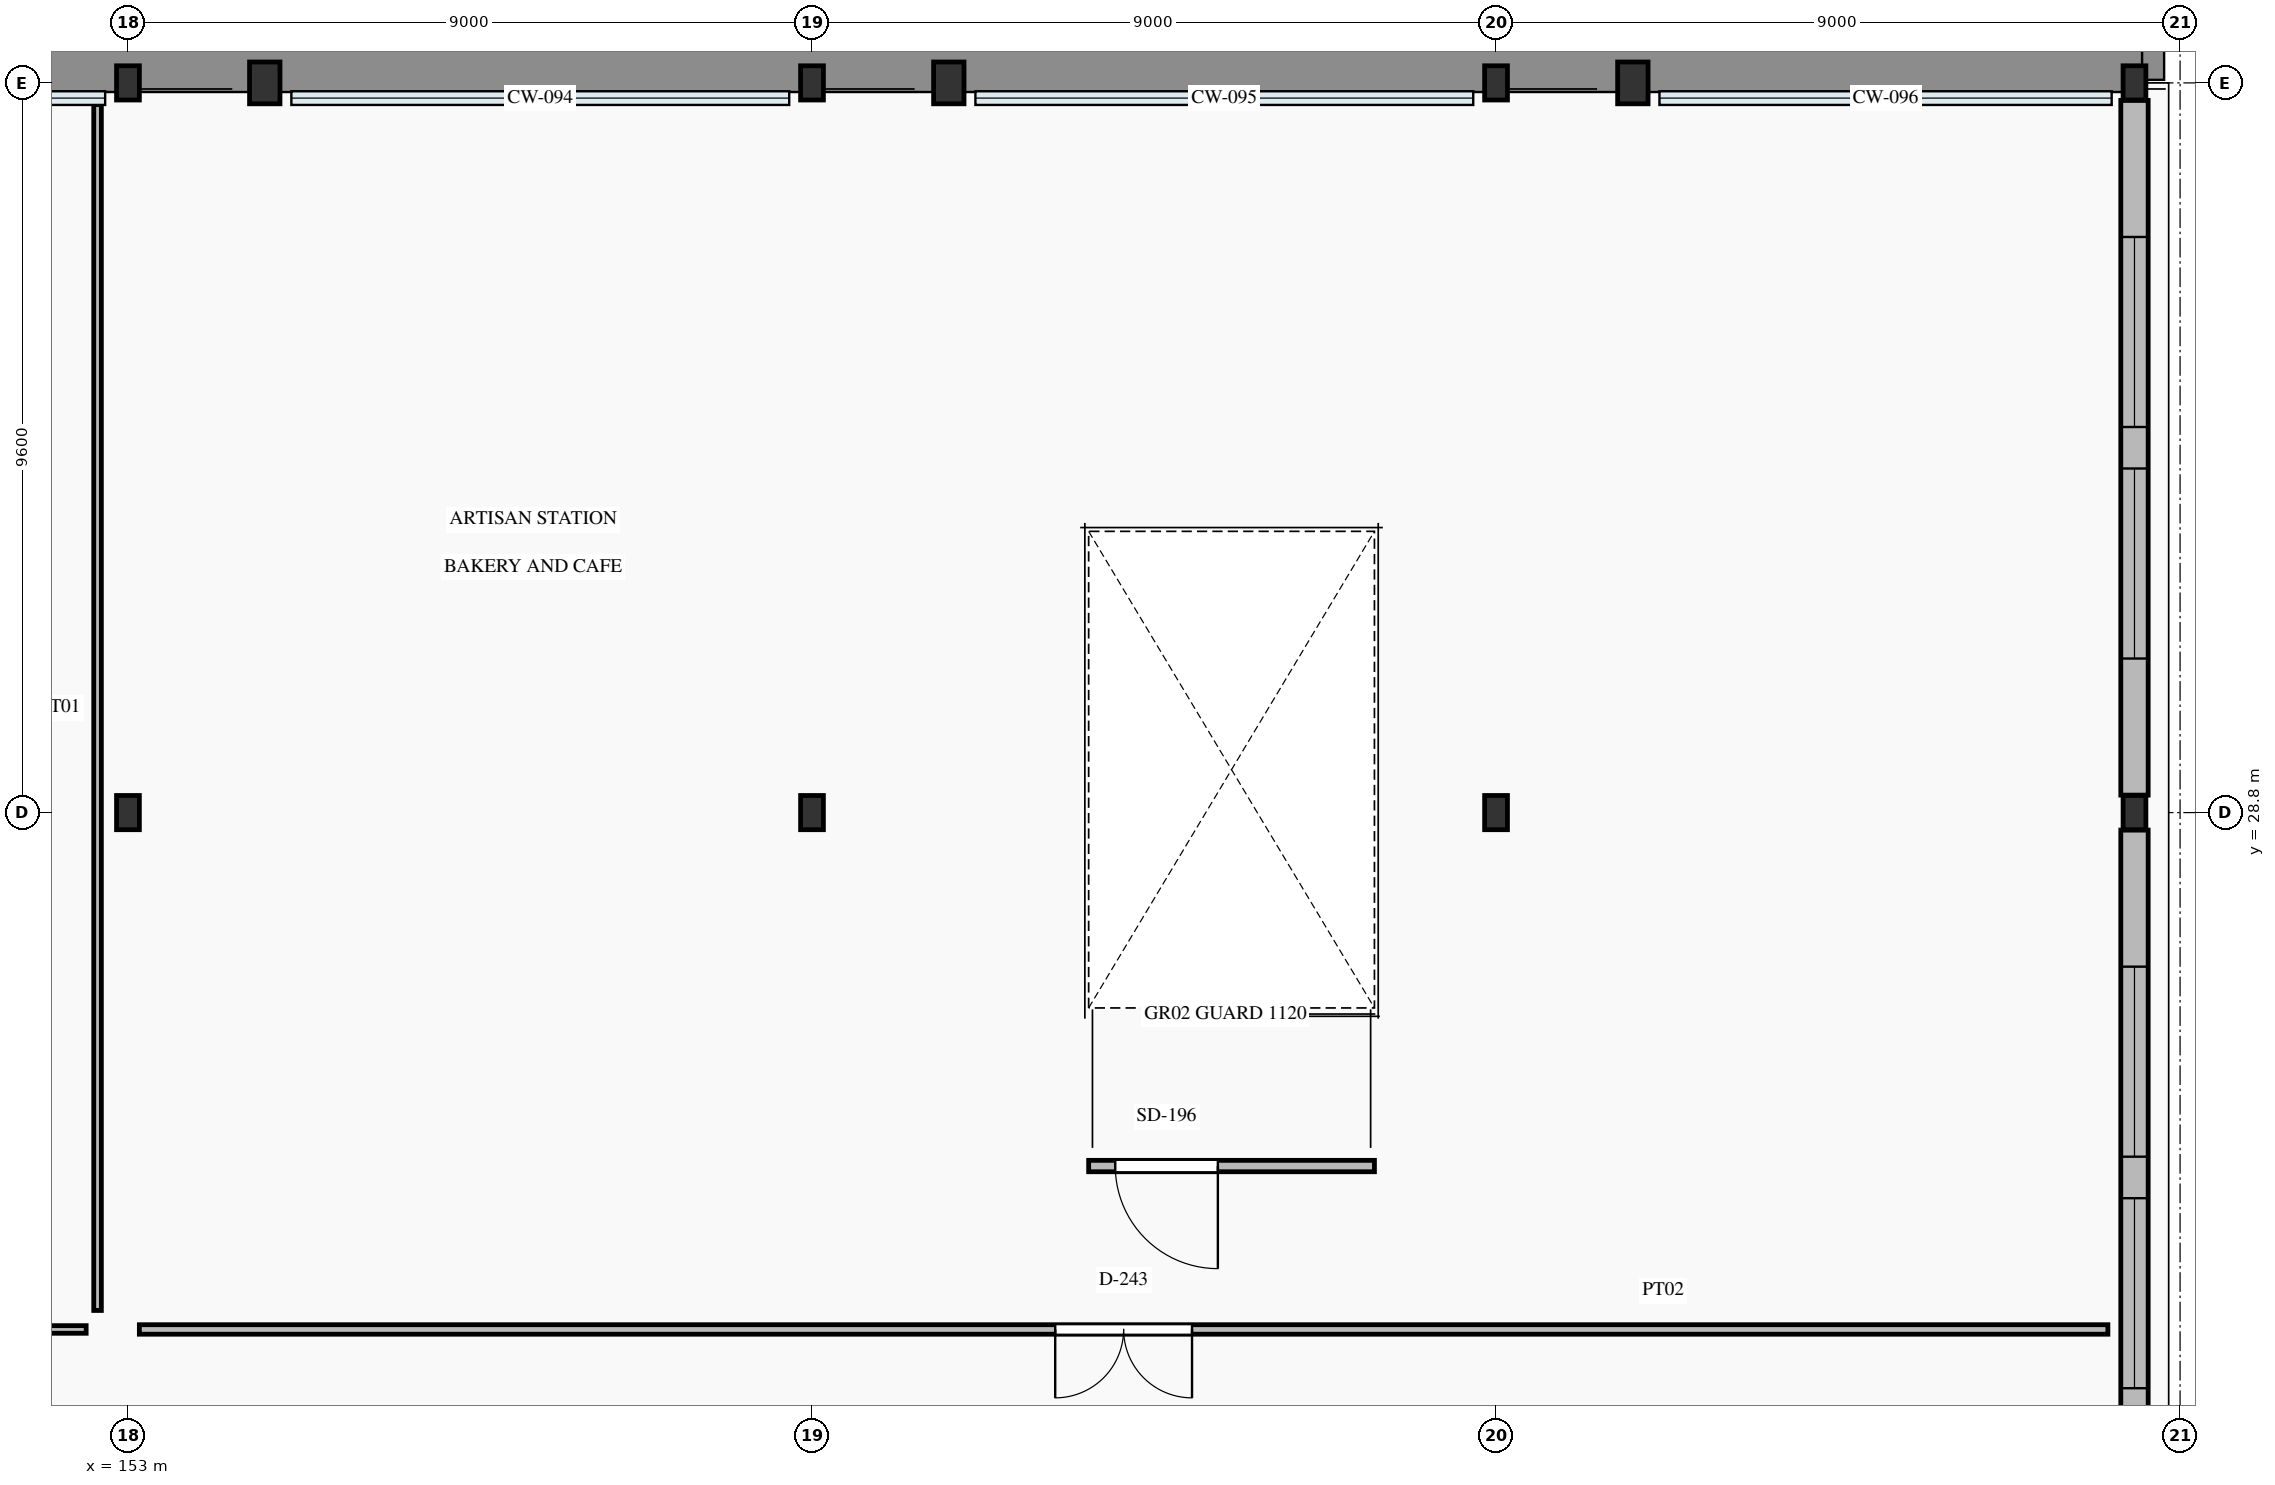
"""IFC4 building model, lengths in metres.
Left out: names, types, materials, properties, quantities, classifications, styles, units other than length and angle.
Written with IfcOpenShell. Run it as: python <this file> out.ifc"""

import sys

from ifc_helpers import new_model, si_unit, direction, frame, frame_2d, origin, origin_2d, place, context, subcontext, project, spatial, rectangle, i_section, extrude, element, fill, save


model = new_model("IFC4")
c1 = context("Model", 3, precision=1e-05, world=origin(), true_north=direction((0.0, 1.0)))
c2 = subcontext(c1, "Body", "Model", "MODEL_VIEW")
j1 = project(units=[si_unit("LENGTHUNIT", "METRE"), si_unit("PLANEANGLEUNIT", "RADIAN")], contexts=[c1])
p1 = place(None, origin())
s1 = spatial("IfcSite", under=j1, at=p1, CompositionType="ELEMENT")
p2 = place(p1, origin())
s2 = spatial("IfcBuilding", under=s1, at=p2, CompositionType="ELEMENT")
p3 = place(p2, frame((0.0, 0.0, 6.0)))
s3 = spatial("IfcBuildingStorey", under=s2, at=p3, CompositionType="ELEMENT", Elevation=6.0)
for number, where, z_axis, x_axis in (
    (1, (153.0, 28.8, 0.0), (0.0, 0.0, 1.0), (1.0, 0.0, 0.0)),
    (2, (153.0, 38.4, 0.0), (0.0, 0.0, 1.0), (1.0, 0.0, 0.0)),
    (3, (162.0, 28.8, 0.0), (0.0, 0.0, 1.0), (1.0, 0.0, 0.0)),
    (4, (162.0, 38.4, 0.0), (0.0, 0.0, 1.0), (1.0, 0.0, 0.0)),
    (5, (171.0, 28.8, 0.0), (0.0, 0.0, 1.0), (1.0, 0.0, 0.0)),
    (6, (171.0, 38.4, 0.0), (0.0, 0.0, 1.0), (1.0, 0.0, 0.0)),
    (7, (179.4, 28.8, 0.0), (0.0, 0.0, 1.0), (1.0, 0.0, 0.0)),
    (8, (179.4, 38.4, 0.0), (0.0, 0.0, 1.0), (1.0, 0.0, 0.0)),
):
    element("IfcColumn", number, at=place(p3, frame(where, z_axis=z_axis, x_axis=x_axis)), inside=s3, PredefinedType="COLUMN", context=c2, shape_type="SweptSolid", body=[
        extrude(i_section(OverallWidth=0.3, OverallDepth=0.45, WebThickness=0.014, FlangeThickness=0.026, FilletRadius=0.027, at=origin_2d()), origin(), (0.0, 0.0, 1.0), 4.8),
    ])
for number, where, z_axis, x_axis in (
    (9, (154.8, 38.4, 0.0), (0.0, 0.0, 1.0), (1.0, 0.0, 0.0)),
    (10, (163.8, 38.4, 0.0), (0.0, 0.0, 1.0), (1.0, 0.0, 0.0)),
    (11, (172.8, 38.4, 0.0), (0.0, 0.0, 1.0), (1.0, 0.0, 0.0)),
):
    element("IfcColumn", number, at=place(p3, frame(where, z_axis=z_axis, x_axis=x_axis)), inside=s3, PredefinedType="PILASTER", context=c2, shape_type="SweptSolid", body=[
        extrude(rectangle(XDim=0.4, YDim=0.55, at=origin_2d()), origin(), (0.0, 0.0, 1.0), 4.8),
    ])
p4 = place(p3, frame((179.4, 19.43, 0.0), z_axis=(0.0, 0.0, 1.0), x_axis=(0.0, 1.0, 0.0)))
e12 = element("IfcWall", 12, at=p4, inside=s3, PredefinedType="SOLIDWALL", context=c2, shape_type="SweptSolid", body=[
    extrude(rectangle(XDim=9.14, YDim=0.36, at=frame_2d((4.57, 0.0))), origin(), (0.0, 0.0, 1.0), 4.185),
])
p5 = place(p4, frame((1.797, 0.0, 0.95)))
e13 = element("IfcOpeningElement", 13, at=p5, cuts=e12, PredefinedType="OPENING", context=c2, shape_type="SweptSolid", body=[
    extrude(rectangle(XDim=2.5, YDim=2.7, at=frame_2d((1.25, 1.35))), frame((0.0, 0.195, 0.0), z_axis=(0.0, -1.0, 0.0), x_axis=(1.0, 0.0, 0.0)), (0.0, 0.0, 1.0), 0.39),
])
p6 = place(p4, frame((4.843, 0.0, 0.95)))
e14 = element("IfcOpeningElement", 14, at=p6, cuts=e12, PredefinedType="OPENING", context=c2, shape_type="SweptSolid", body=[
    extrude(rectangle(XDim=2.5, YDim=2.7, at=frame_2d((1.25, 1.35))), frame((0.0, 0.195, 0.0), z_axis=(0.0, -1.0, 0.0), x_axis=(1.0, 0.0, 0.0)), (0.0, 0.0, 1.0), 0.39),
])
p7 = place(p3, frame((179.4, 29.03, 0.0), z_axis=(0.0, 0.0, 1.0), x_axis=(0.0, 1.0, 0.0)))
e15 = element("IfcWall", 15, at=p7, inside=s3, PredefinedType="SOLIDWALL", context=c2, shape_type="SweptSolid", body=[
    extrude(rectangle(XDim=9.14, YDim=0.36, at=frame_2d((4.57, 0.0))), origin(), (0.0, 0.0, 1.0), 4.185),
])
p8 = place(p7, frame((1.797, 0.0, 0.95)))
e16 = element("IfcOpeningElement", 16, at=p8, cuts=e15, PredefinedType="OPENING", context=c2, shape_type="SweptSolid", body=[
    extrude(rectangle(XDim=2.5, YDim=2.7, at=frame_2d((1.25, 1.35))), frame((0.0, 0.195, 0.0), z_axis=(0.0, -1.0, 0.0), x_axis=(1.0, 0.0, 0.0)), (0.0, 0.0, 1.0), 0.39),
])
p9 = place(p7, frame((4.843, 0.0, 0.95)))
e17 = element("IfcOpeningElement", 17, at=p9, cuts=e15, PredefinedType="OPENING", context=c2, shape_type="SweptSolid", body=[
    extrude(rectangle(XDim=2.5, YDim=2.7, at=frame_2d((1.25, 1.35))), frame((0.0, 0.195, 0.0), z_axis=(0.0, -1.0, 0.0), x_axis=(1.0, 0.0, 0.0)), (0.0, 0.0, 1.0), 0.39),
])
p10 = place(p3, frame((165.64, 24.15, 0.0), z_axis=(0.0, 0.0, 1.0), x_axis=(1.0, 0.0, 0.0)))
e18 = element("IfcWall", 18, at=p10, inside=s3, PredefinedType="PARTITIONING", context=c2, shape_type="SweptSolid", body=[
    extrude(rectangle(XDim=3.76, YDim=0.15, at=frame_2d((1.88, 0.0))), origin(), (0.0, 0.0, 1.0), 4.53),
])
p11 = place(p10, frame((0.35, 0.0, 0.0)))
e19 = element("IfcOpeningElement", 19, at=p11, cuts=e18, PredefinedType="OPENING", context=c2, shape_type="SweptSolid", body=[
    extrude(rectangle(XDim=1.35, YDim=2.2, at=frame_2d((0.675, 1.1))), frame((0.0, 0.09, 0.0), z_axis=(0.0, -1.0, 0.0), x_axis=(1.0, 0.0, 0.0)), (0.0, 0.0, 1.0), 0.18),
])
p12 = place(p3, frame((139.0, 22.0, 0.0), z_axis=(0.0, 0.0, 1.0), x_axis=(1.0, 0.0, 0.0)))
e20 = element("IfcWall", 20, at=p12, inside=s3, PredefinedType="PARTITIONING", context=c2, shape_type="SweptSolid", body=[
    extrude(rectangle(XDim=13.45, YDim=0.1, at=frame_2d((6.725, 0.0))), origin(), (0.0, 0.0, 1.0), 4.53),
])
p13 = place(p12, frame((5.825, 0.0, 0.0)))
e21 = element("IfcOpeningElement", 21, at=p13, cuts=e20, PredefinedType="OPENING", context=c2, shape_type="SweptSolid", body=[
    extrude(rectangle(XDim=1.8, YDim=2.3, at=frame_2d((0.9, 1.15))), frame((0.0, 0.065, 0.0), z_axis=(0.0, -1.0, 0.0), x_axis=(1.0, 0.0, 0.0)), (0.0, 0.0, 1.0), 0.13),
])
p14 = place(p3, frame((153.15, 22.0, 0.0), z_axis=(0.0, 0.0, 1.0), x_axis=(1.0, 0.0, 0.0)))
e22 = element("IfcWall", 22, at=p14, inside=s3, PredefinedType="PARTITIONING", context=c2, shape_type="SweptSolid", body=[
    extrude(rectangle(XDim=25.9, YDim=0.125, at=frame_2d((12.95, 0.0))), origin(), (0.0, 0.0, 1.0), 4.53),
])
p15 = place(p14, frame((12.05, 0.0, 0.0)))
e23 = element("IfcOpeningElement", 23, at=p15, cuts=e22, PredefinedType="OPENING", context=c2, shape_type="SweptSolid", body=[
    extrude(rectangle(XDim=1.8, YDim=2.3, at=frame_2d((0.9, 1.15))), frame((0.0, 0.077, 0.0), z_axis=(0.0, -1.0, 0.0), x_axis=(1.0, 0.0, 0.0)), (0.0, 0.0, 1.0), 0.155),
])
p16 = place(p3, frame((152.6, 22.25, 0.0), z_axis=(0.0, 0.0, 1.0), x_axis=(0.0, 1.0, 0.0)))
e24 = element("IfcWall", 24, at=p16, inside=s3, PredefinedType="PARTITIONING", context=c2, shape_type="SweptSolid", body=[
    extrude(rectangle(XDim=15.865, YDim=0.1, at=frame_2d((7.933, 0.0))), origin(), (0.0, 0.0, 1.0), 4.53),
])
p17 = place(p5, origin())
e25 = element("IfcWindow", 25, at=p17, inside=s3, PartitioningType="SINGLE_PANEL", PredefinedType="WINDOW", context=c2, shape_type="SweptSolid", body=[
    extrude(rectangle(XDim=2.5, YDim=2.7, at=frame_2d((1.25, 1.35))), frame((0.0, 0.03, 0.0), z_axis=(0.0, -1.0, 0.0), x_axis=(1.0, 0.0, 0.0)), (0.0, 0.0, 1.0), 0.06),
])
fill(e13, e25)
p18 = place(p6, origin())
e26 = element("IfcWindow", 26, at=p18, inside=s3, PartitioningType="SINGLE_PANEL", PredefinedType="WINDOW", context=c2, shape_type="SweptSolid", body=[
    extrude(rectangle(XDim=2.5, YDim=2.7, at=frame_2d((1.25, 1.35))), frame((0.0, 0.03, 0.0), z_axis=(0.0, -1.0, 0.0), x_axis=(1.0, 0.0, 0.0)), (0.0, 0.0, 1.0), 0.06),
])
fill(e14, e26)
p19 = place(p8, origin())
e27 = element("IfcWindow", 27, at=p19, inside=s3, PartitioningType="SINGLE_PANEL", PredefinedType="WINDOW", context=c2, shape_type="SweptSolid", body=[
    extrude(rectangle(XDim=2.5, YDim=2.7, at=frame_2d((1.25, 1.35))), frame((0.0, 0.03, 0.0), z_axis=(0.0, -1.0, 0.0), x_axis=(1.0, 0.0, 0.0)), (0.0, 0.0, 1.0), 0.06),
])
fill(e16, e27)
p20 = place(p9, origin())
e28 = element("IfcWindow", 28, at=p20, inside=s3, PartitioningType="SINGLE_PANEL", PredefinedType="WINDOW", context=c2, shape_type="SweptSolid", body=[
    extrude(rectangle(XDim=2.5, YDim=2.7, at=frame_2d((1.25, 1.35))), frame((0.0, 0.03, 0.0), z_axis=(0.0, -1.0, 0.0), x_axis=(1.0, 0.0, 0.0)), (0.0, 0.0, 1.0), 0.06),
])
fill(e17, e28)
p21 = place(p11, frame((1.35, 0.0, 0.0), z_axis=(0.0, 0.0, 1.0), x_axis=(-1.0, 0.0, 0.0)))
e29 = element("IfcDoor", 29, at=p21, inside=s3, OperationType="SINGLE_SWING_RIGHT", PredefinedType="DOOR", context=c2, shape_type="SweptSolid", body=[
    extrude(rectangle(XDim=1.35, YDim=2.2, at=frame_2d((0.675, 1.1))), frame((0.0, 0.025, 0.0), z_axis=(0.0, -1.0, 0.0), x_axis=(1.0, 0.0, 0.0)), (0.0, 0.0, 1.0), 0.05),
])
fill(e19, e29)
p22 = place(p15, frame((1.8, 0.0, 0.0), z_axis=(0.0, 0.0, 1.0), x_axis=(-1.0, 0.0, 0.0)))
e30 = element("IfcDoor", 30, at=p22, inside=s3, OperationType="DOUBLE_DOOR_SINGLE_SWING", PredefinedType="DOOR", context=c2, shape_type="SweptSolid", body=[
    extrude(rectangle(XDim=1.8, YDim=2.3, at=frame_2d((0.9, 1.15))), frame((0.0, 0.025, 0.0), z_axis=(0.0, -1.0, 0.0), x_axis=(1.0, 0.0, 0.0)), (0.0, 0.0, 1.0), 0.05),
])
fill(e23, e30)
save(model, sys.argv[1])
